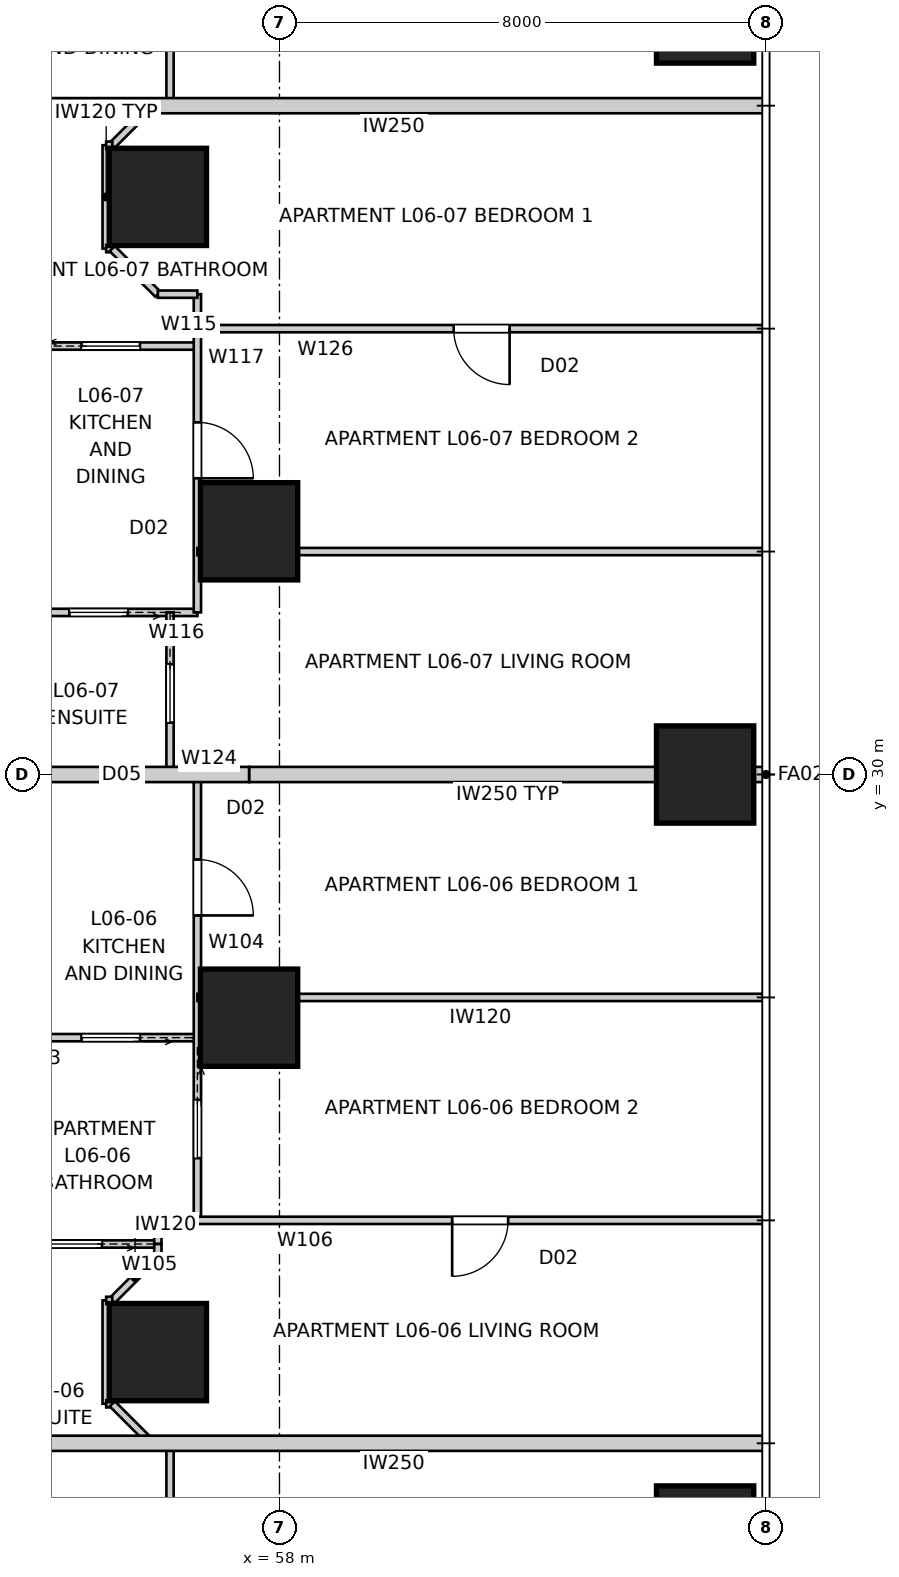
"""IFC4 building model, lengths in metres.
Left out: names, types, materials, properties, quantities, classifications, styles, units other than length and angle.
Written with IfcOpenShell. Run it as: python <this file> out.ifc"""

import sys

from ifc_helpers import new_model, si_unit, direction, frame, frame_2d, origin, origin_2d, place, context, subcontext, project, spatial, rectangle, extrude, element, fill, save


model = new_model("IFC4")
c1 = context("Model", 3, precision=1e-05, world=origin(), true_north=direction((0.0, 1.0)))
c2 = subcontext(c1, "Body", "Model", "MODEL_VIEW")
j1 = project(units=[si_unit("LENGTHUNIT", "METRE"), si_unit("PLANEANGLEUNIT", "RADIAN")], contexts=[c1])
p1 = place(None, origin())
s1 = spatial("IfcSite", under=j1, at=p1, CompositionType="ELEMENT")
p2 = place(p1, origin())
s2 = spatial("IfcBuilding", under=s1, at=p2, CompositionType="ELEMENT")
p3 = place(p2, frame((0.0, 0.0, 25.2)))
s3 = spatial("IfcBuildingStorey", under=s2, at=p3, CompositionType="ELEMENT", Elevation=25.2)
for number, where, z_axis, x_axis in (
    (1, (65.0, 17.5, 0.0), (0.0, 0.0, 1.0), (1.0, 0.0, 0.0)),
    (2, (65.0, 30.0, 0.0), (0.0, 0.0, 1.0), (1.0, 0.0, 0.0)),
    (3, (65.0, 42.5, 0.0), (0.0, 0.0, 1.0), (1.0, 0.0, 0.0)),
    (4, (57.5, 26.0, 0.0), (0.0, 0.0, 1.0), (1.0, 0.0, 0.0)),
    (5, (57.5, 34.0, 0.0), (0.0, 0.0, 1.0), (1.0, 0.0, 0.0)),
    (6, (56.0, 39.5, 0.0), (0.0, 0.0, 1.0), (1.0, 0.0, 0.0)),
    (7, (56.0, 20.5, 0.0), (0.0, 0.0, 1.0), (1.0, 0.0, 0.0)),
):
    element("IfcColumn", number, at=place(p3, frame(where, z_axis=z_axis, x_axis=x_axis)), inside=s3, PredefinedType="COLUMN", context=c2, shape_type="SweptSolid", body=[
        extrude(rectangle(XDim=1.6, YDim=1.6, at=origin_2d()), origin(), (0.0, 0.0, 1.0), 3.4),
    ])
for number, where, z_axis, x_axis in (
    (8, (66.0, 19.0, 0.0), (0.0, 0.0, 1.0), (-1.0, 0.0, 0.0)),
    (9, (66.0, 41.0, 0.0), (0.0, 0.0, 1.0), (-1.0, 0.0, 0.0)),
):
    element("IfcWall", number, at=place(p3, frame(where, z_axis=z_axis, x_axis=x_axis)), inside=s3, PredefinedType="PARTITIONING", context=c2, shape_type="SweptSolid", body=[
        extrude(rectangle(XDim=12.24, YDim=0.25, at=frame_2d((6.12, 0.0))), origin(), (0.0, 0.0, 1.0), 3.25),
    ])
p4 = place(p3, frame((66.0, 30.0, 0.0), z_axis=(0.0, 0.0, 1.0), x_axis=(-1.0, 0.0, 0.0)))
e10 = element("IfcWall", 10, at=p4, inside=s3, PredefinedType="PARTITIONING", context=c2, shape_type="SweptSolid", body=[
    extrude(rectangle(XDim=8.5, YDim=0.25, at=frame_2d((4.25, 0.0))), origin(), (0.0, 0.0, 1.0), 3.25),
])
p5 = place(p3, frame((57.5, 30.0, 0.0), z_axis=(0.0, 0.0, 1.0), x_axis=(-1.0, 0.0, 0.0)))
e11 = element("IfcWall", 11, at=p5, inside=s3, PredefinedType="PARTITIONING", context=c2, shape_type="SweptSolid", body=[
    extrude(rectangle(XDim=3.74, YDim=0.25, at=frame_2d((1.87, 0.0))), origin(), (0.0, 0.0, 1.0), 2.796),
])
p6 = place(p3, frame((56.2, 19.0, 0.0), z_axis=(0.0, 0.0, 1.0), x_axis=(0.0, -1.0, 0.0)))
e12 = element("IfcWall", 12, at=p6, inside=s3, PredefinedType="PARTITIONING", context=c2, shape_type="SweptSolid", body=[
    extrude(rectangle(XDim=7.8, YDim=0.12, at=frame_2d((3.9, 0.0))), origin(), (0.0, 0.0, 1.0), 3.25),
])
p7 = place(p6, frame((2.24, 0.0, 0.0)))
e13 = element("IfcOpeningElement", 13, at=p7, cuts=e12, PredefinedType="OPENING", context=c2, shape_type="SweptSolid", body=[
    extrude(rectangle(XDim=0.92, YDim=2.34, at=frame_2d((0.46, 1.17))), frame((0.0, 0.07, 0.0), z_axis=(0.0, -1.0, 0.0), x_axis=(1.0, 0.0, 0.0)), (0.0, 0.0, 1.0), 0.14),
])
p8 = place(p3, frame((56.65, 25.672, 0.0), z_axis=(0.0, 0.0, 1.0), x_axis=(-1.0, 0.0, 0.0)))
e14 = element("IfcWall", 14, at=p8, inside=s3, PredefinedType="PARTITIONING", context=c2, shape_type="SweptSolid", body=[
    extrude(rectangle(XDim=2.85, YDim=0.12, at=frame_2d((1.425, 0.0))), origin(), (0.0, 0.0, 1.0), 3.25),
])
p9 = place(p8, frame((0.945, 0.0, 0.0)))
e15 = element("IfcOpeningElement", 15, at=p9, cuts=e14, PredefinedType="OPENING", context=c2, shape_type="SweptSolid", body=[
    extrude(rectangle(XDim=0.96, YDim=2.1, at=frame_2d((0.48, 1.05))), frame((0.0, 0.07, 0.0), z_axis=(0.0, -1.0, 0.0), x_axis=(1.0, 0.0, 0.0)), (0.0, 0.0, 1.0), 0.14),
])
p10 = place(p3, frame((56.65, 30.0, 0.0), z_axis=(0.0, 0.0, 1.0), x_axis=(0.0, -1.0, 0.0)))
e16 = element("IfcWall", 16, at=p10, inside=s3, PredefinedType="PARTITIONING", context=c2, shape_type="SweptSolid", body=[
    extrude(rectangle(XDim=7.333, YDim=0.12, at=frame_2d((3.667, 0.0))), origin(), (0.0, 0.0, 1.0), 2.55),
])
p11 = place(p10, frame((1.398, 0.0, 0.0)))
e17 = element("IfcOpeningElement", 17, at=p11, cuts=e16, PredefinedType="OPENING", context=c2, shape_type="SweptSolid", body=[
    extrude(rectangle(XDim=0.92, YDim=2.34, at=frame_2d((0.46, 1.17))), frame((0.0, 0.07, 0.0), z_axis=(0.0, -1.0, 0.0), x_axis=(1.0, 0.0, 0.0)), (0.0, 0.0, 1.0), 0.14),
])
p12 = place(p10, frame((5.351, 0.0, 0.0)))
e18 = element("IfcOpeningElement", 18, at=p12, cuts=e16, PredefinedType="OPENING", context=c2, shape_type="SweptSolid", body=[
    extrude(rectangle(XDim=0.96, YDim=2.1, at=frame_2d((0.48, 1.05))), frame((0.0, 0.07, 0.0), z_axis=(0.0, -1.0, 0.0), x_axis=(1.0, 0.0, 0.0)), (0.0, 0.0, 1.0), 0.14),
])
p13 = place(p3, frame((56.0, 22.278, 0.0), z_axis=(0.0, 0.0, 1.0), x_axis=(-1.0, 0.0, 0.0)))
e19 = element("IfcWall", 19, at=p13, inside=s3, PredefinedType="PARTITIONING", context=c2, shape_type="SweptSolid", body=[
    extrude(rectangle(XDim=2.2, YDim=0.12, at=frame_2d((1.1, 0.0))), origin(), (0.0, 0.0, 1.0), 3.25),
])
p14 = place(p13, frame((0.92, 0.0, 0.0)))
e20 = element("IfcOpeningElement", 20, at=p14, cuts=e19, PredefinedType="OPENING", context=c2, shape_type="SweptSolid", body=[
    extrude(rectangle(XDim=0.96, YDim=2.1, at=frame_2d((0.48, 1.05))), frame((0.0, 0.07, 0.0), z_axis=(0.0, -1.0, 0.0), x_axis=(1.0, 0.0, 0.0)), (0.0, 0.0, 1.0), 0.14),
])
p15 = place(p3, frame((65.96, 22.667, 0.0), z_axis=(0.0, 0.0, 1.0), x_axis=(-1.0, 0.0, 0.0)))
e21 = element("IfcWall", 21, at=p15, inside=s3, PredefinedType="PARTITIONING", context=c2, shape_type="SweptSolid", body=[
    extrude(rectangle(XDim=9.96, YDim=0.12, at=frame_2d((4.98, 0.0))), origin(), (0.0, 0.0, 1.0), 3.25),
])
p16 = place(p15, frame((4.2, 0.0, 0.0)))
e22 = element("IfcOpeningElement", 22, at=p16, cuts=e21, PredefinedType="OPENING", context=c2, shape_type="SweptSolid", body=[
    extrude(rectangle(XDim=0.92, YDim=2.34, at=frame_2d((0.46, 1.17))), frame((0.0, 0.07, 0.0), z_axis=(0.0, -1.0, 0.0), x_axis=(1.0, 0.0, 0.0)), (0.0, 0.0, 1.0), 0.14),
])
p17 = place(p3, frame((56.0, 22.667, 0.0), z_axis=(0.0, 0.0, 1.0), x_axis=(0.0, -1.0, 0.0)))
e23 = element("IfcWall", 23, at=p17, inside=s3, PredefinedType="PARTITIONING", context=c2, shape_type="SweptSolid", body=[
    extrude(rectangle(XDim=0.389, YDim=0.12, at=frame_2d((0.194, 0.0))), origin(), (0.0, 0.0, 1.0), 3.25),
])
p18 = place(p3, frame((56.0, 22.1, 0.0), z_axis=(0.0, 0.0, 1.0), x_axis=(-0.707106781187, -0.707106781187, 0.0)))
e24 = element("IfcWall", 24, at=p18, inside=s3, PredefinedType="PARTITIONING", context=c2, shape_type="SweptSolid", body=[
    extrude(rectangle(XDim=1.061, YDim=0.12, at=frame_2d((0.53, 0.0))), origin(), (0.0, 0.0, 1.0), 3.25),
])
p19 = place(p3, frame((55.15, 21.35, 0.0), z_axis=(0.0, 0.0, 1.0), x_axis=(0.0, -1.0, 0.0)))
e25 = element("IfcWall", 25, at=p19, inside=s3, PredefinedType="PARTITIONING", context=c2, shape_type="SweptSolid", body=[
    extrude(rectangle(XDim=1.7, YDim=0.12, at=frame_2d((0.85, 0.0))), origin(), (0.0, 0.0, 1.0), 3.25),
])
p20 = place(p3, frame((55.25, 19.65, 0.0), z_axis=(0.0, 0.0, 1.0), x_axis=(0.707106781187, -0.707106781187, 0.0)))
e26 = element("IfcWall", 26, at=p20, inside=s3, PredefinedType="PARTITIONING", context=c2, shape_type="SweptSolid", body=[
    extrude(rectangle(XDim=0.919, YDim=0.12, at=frame_2d((0.459, 0.0))), origin(), (0.0, 0.0, 1.0), 3.25),
])
p21 = place(p3, frame((65.96, 26.333, 0.0), z_axis=(0.0, 0.0, 1.0), x_axis=(-1.0, 0.0, 0.0)))
e27 = element("IfcWall", 27, at=p21, inside=s3, PredefinedType="PARTITIONING", context=c2, shape_type="SweptSolid", body=[
    extrude(rectangle(XDim=9.31, YDim=0.12, at=frame_2d((4.655, 0.0))), origin(), (0.0, 0.0, 1.0), 3.25),
])
p22 = place(p3, frame((53.8, 37.046, 0.0), z_axis=(0.0, 0.0, 1.0), x_axis=(1.0, 0.0, 0.0)))
e28 = element("IfcWall", 28, at=p22, inside=s3, PredefinedType="PARTITIONING", context=c2, shape_type="SweptSolid", body=[
    extrude(rectangle(XDim=2.85, YDim=0.12, at=frame_2d((1.425, 0.0))), origin(), (0.0, 0.0, 1.0), 3.25),
])
p23 = place(p22, frame((0.945, 0.0, 0.0)))
e29 = element("IfcOpeningElement", 29, at=p23, cuts=e28, PredefinedType="OPENING", context=c2, shape_type="SweptSolid", body=[
    extrude(rectangle(XDim=0.96, YDim=2.1, at=frame_2d((0.48, 1.05))), frame((0.0, 0.07, 0.0), z_axis=(0.0, -1.0, 0.0), x_axis=(1.0, 0.0, 0.0)), (0.0, 0.0, 1.0), 0.14),
])
p24 = place(p3, frame((56.65, 32.666, 0.0), z_axis=(0.0, 0.0, 1.0), x_axis=(-1.0, 0.0, 0.0)))
e30 = element("IfcWall", 30, at=p24, inside=s3, PredefinedType="PARTITIONING", context=c2, shape_type="SweptSolid", body=[
    extrude(rectangle(XDim=2.85, YDim=0.12, at=frame_2d((1.425, 0.0))), origin(), (0.0, 0.0, 1.0), 3.25),
])
p25 = place(p24, frame((1.145, 0.0, 0.0)))
e31 = element("IfcOpeningElement", 31, at=p25, cuts=e30, PredefinedType="OPENING", context=c2, shape_type="SweptSolid", body=[
    extrude(rectangle(XDim=0.96, YDim=2.1, at=frame_2d((0.48, 1.05))), frame((0.0, 0.07, 0.0), z_axis=(0.0, -1.0, 0.0), x_axis=(1.0, 0.0, 0.0)), (0.0, 0.0, 1.0), 0.14),
])
p26 = place(p3, frame((56.65, 37.9, 0.0), z_axis=(0.0, 0.0, 1.0), x_axis=(0.0, -1.0, 0.0)))
e32 = element("IfcWall", 32, at=p26, inside=s3, PredefinedType="PARTITIONING", context=c2, shape_type="SweptSolid", body=[
    extrude(rectangle(XDim=5.234, YDim=0.12, at=frame_2d((2.617, 0.0))), origin(), (0.0, 0.0, 1.0), 2.55),
])
p27 = place(p26, frame((2.109, 0.0, 0.0)))
e33 = element("IfcOpeningElement", 33, at=p27, cuts=e32, PredefinedType="OPENING", context=c2, shape_type="SweptSolid", body=[
    extrude(rectangle(XDim=0.92, YDim=2.34, at=frame_2d((0.46, 1.17))), frame((0.0, 0.07, 0.0), z_axis=(0.0, -1.0, 0.0), x_axis=(1.0, 0.0, 0.0)), (0.0, 0.0, 1.0), 0.14),
])
p28 = place(p3, frame((55.9, 41.0, 0.0), z_axis=(0.0, 0.0, 1.0), x_axis=(-0.707106781187, -0.707106781187, 0.0)))
e34 = element("IfcWall", 34, at=p28, inside=s3, PredefinedType="PARTITIONING", context=c2, shape_type="SweptSolid", body=[
    extrude(rectangle(XDim=0.919, YDim=0.12, at=frame_2d((0.459, 0.0))), origin(), (0.0, 0.0, 1.0), 3.25),
])
p29 = place(p3, frame((55.15, 40.35, 0.0), z_axis=(0.0, 0.0, 1.0), x_axis=(0.0, -1.0, 0.0)))
e35 = element("IfcWall", 35, at=p29, inside=s3, PredefinedType="PARTITIONING", context=c2, shape_type="SweptSolid", body=[
    extrude(rectangle(XDim=1.7, YDim=0.12, at=frame_2d((0.85, 0.0))), origin(), (0.0, 0.0, 1.0), 3.25),
])
p30 = place(p3, frame((55.25, 38.65, 0.0), z_axis=(0.0, 0.0, 1.0), x_axis=(0.707106781187, -0.707106781187, 0.0)))
e36 = element("IfcWall", 36, at=p30, inside=s3, PredefinedType="PARTITIONING", context=c2, shape_type="SweptSolid", body=[
    extrude(rectangle(XDim=1.061, YDim=0.12, at=frame_2d((0.53, 0.0))), origin(), (0.0, 0.0, 1.0), 3.25),
])
p31 = place(p3, frame((56.0, 37.9, 0.0), z_axis=(0.0, 0.0, 1.0), x_axis=(1.0, 0.0, 0.0)))
e37 = element("IfcWall", 37, at=p31, inside=s3, PredefinedType="PARTITIONING", context=c2, shape_type="SweptSolid", body=[
    extrude(rectangle(XDim=0.65, YDim=0.12, at=frame_2d((0.325, 0.0))), origin(), (0.0, 0.0, 1.0), 3.25),
])
p32 = place(p3, frame((56.2, 32.666, 0.0), z_axis=(0.0, 0.0, 1.0), x_axis=(0.0, -1.0, 0.0)))
e38 = element("IfcWall", 38, at=p32, inside=s3, PredefinedType="PARTITIONING", context=c2, shape_type="SweptSolid", body=[
    extrude(rectangle(XDim=2.666, YDim=0.12, at=frame_2d((1.333, 0.0))), origin(), (0.0, 0.0, 1.0), 3.25),
])
p33 = place(p32, frame((0.853, 0.0, 0.0)))
e39 = element("IfcOpeningElement", 39, at=p33, cuts=e38, PredefinedType="OPENING", context=c2, shape_type="SweptSolid", body=[
    extrude(rectangle(XDim=0.96, YDim=2.1, at=frame_2d((0.48, 1.05))), frame((0.0, 0.07, 0.0), z_axis=(0.0, -1.0, 0.0), x_axis=(1.0, 0.0, 0.0)), (0.0, 0.0, 1.0), 0.14),
])
p34 = place(p3, frame((56.65, 33.667, 0.0), z_axis=(0.0, 0.0, 1.0), x_axis=(1.0, 0.0, 0.0)))
e40 = element("IfcWall", 40, at=p34, inside=s3, PredefinedType="PARTITIONING", context=c2, shape_type="SweptSolid", body=[
    extrude(rectangle(XDim=9.31, YDim=0.12, at=frame_2d((4.655, 0.0))), origin(), (0.0, 0.0, 1.0), 3.25),
])
p35 = place(p3, frame((65.96, 37.333, 0.0), z_axis=(0.0, 0.0, 1.0), x_axis=(-1.0, 0.0, 0.0)))
e41 = element("IfcWall", 41, at=p35, inside=s3, PredefinedType="PARTITIONING", context=c2, shape_type="SweptSolid", body=[
    extrude(rectangle(XDim=9.31, YDim=0.12, at=frame_2d((4.655, 0.0))), origin(), (0.0, 0.0, 1.0), 3.25),
])
p36 = place(p35, frame((4.175, 0.0, 0.0)))
e42 = element("IfcOpeningElement", 42, at=p36, cuts=e41, PredefinedType="OPENING", context=c2, shape_type="SweptSolid", body=[
    extrude(rectangle(XDim=0.92, YDim=2.34, at=frame_2d((0.46, 1.17))), frame((0.0, 0.07, 0.0), z_axis=(0.0, -1.0, 0.0), x_axis=(1.0, 0.0, 0.0)), (0.0, 0.0, 1.0), 0.14),
])
p37 = place(p3, frame((56.2, 48.333, 0.0), z_axis=(0.0, 0.0, 1.0), x_axis=(0.0, -1.0, 0.0)))
e43 = element("IfcWall", 43, at=p37, inside=s3, PredefinedType="PARTITIONING", context=c2, shape_type="SweptSolid", body=[
    extrude(rectangle(XDim=7.333, YDim=0.12, at=frame_2d((3.667, 0.0))), origin(), (0.0, 0.0, 1.0), 3.25),
])
p38 = place(p37, frame((3.207, 0.0, 0.0)))
e44 = element("IfcOpeningElement", 44, at=p38, cuts=e43, PredefinedType="OPENING", context=c2, shape_type="SweptSolid", body=[
    extrude(rectangle(XDim=0.92, YDim=2.34, at=frame_2d((0.46, 1.17))), frame((0.0, 0.07, 0.0), z_axis=(0.0, -1.0, 0.0), x_axis=(1.0, 0.0, 0.0)), (0.0, 0.0, 1.0), 0.14),
])
p39 = place(p3, frame((56.0, 22.1, 0.0), z_axis=(0.0, 0.0, 1.0), x_axis=(0.0, 1.0, 0.0)))
e45 = element("IfcWall", 45, at=p39, inside=s3, PredefinedType="PARTITIONING", context=c2, shape_type="SweptSolid", body=[
    extrude(rectangle(XDim=0.178, YDim=0.12, at=frame_2d((0.089, 0.0))), origin(), (0.0, 0.0, 1.0), 3.25),
])
for number, where, z_axis, x_axis in (
    (46, (55.15, 21.35, 0.0), (0.0, 0.0, 1.0), (1.0, 0.0, 0.0)),
    (47, (55.15, 19.65, 0.0), (0.0, 0.0, 1.0), (1.0, 0.0, 0.0)),
    (48, (55.15, 40.35, 0.0), (0.0, 0.0, 1.0), (1.0, 0.0, 0.0)),
    (49, (55.15, 38.65, 0.0), (0.0, 0.0, 1.0), (1.0, 0.0, 0.0)),
):
    element("IfcWall", number, at=place(p3, frame(where, z_axis=z_axis, x_axis=x_axis)), inside=s3, PredefinedType="PARTITIONING", context=c2, shape_type="SweptSolid", body=[
        extrude(rectangle(XDim=0.1, YDim=0.12, at=frame_2d((0.05, 0.0))), origin(), (0.0, 0.0, 1.0), 3.25),
    ])
p40 = place(p27, origin())
e50 = element("IfcDoor", 50, at=p40, inside=s3, OperationType="SINGLE_SWING_RIGHT", PredefinedType="DOOR", context=c2, shape_type="SweptSolid", body=[
    extrude(rectangle(XDim=0.92, YDim=2.34, at=frame_2d((0.46, 1.17))), frame((0.0, 0.025, 0.0), z_axis=(0.0, -1.0, 0.0), x_axis=(1.0, 0.0, 0.0)), (0.0, 0.0, 1.0), 0.05),
])
fill(e33, e50)
p41 = place(p23, origin())
e51 = element("IfcDoor", 51, at=p41, inside=s3, OperationType="SLIDING_TO_LEFT", PredefinedType="DOOR", context=c2, shape_type="SweptSolid", body=[
    extrude(rectangle(XDim=0.96, YDim=2.1, at=frame_2d((0.48, 1.05))), frame((0.0, 0.025, 0.0), z_axis=(0.0, -1.0, 0.0), x_axis=(1.0, 0.0, 0.0)), (0.0, 0.0, 1.0), 0.05),
])
fill(e29, e51)
p42 = place(p25, origin())
e52 = element("IfcDoor", 52, at=p42, inside=s3, OperationType="SLIDING_TO_LEFT", PredefinedType="DOOR", context=c2, shape_type="SweptSolid", body=[
    extrude(rectangle(XDim=0.96, YDim=2.1, at=frame_2d((0.48, 1.05))), frame((0.0, 0.025, 0.0), z_axis=(0.0, -1.0, 0.0), x_axis=(1.0, 0.0, 0.0)), (0.0, 0.0, 1.0), 0.05),
])
fill(e31, e52)
p43 = place(p11, origin())
e53 = element("IfcDoor", 53, at=p43, inside=s3, OperationType="SINGLE_SWING_RIGHT", PredefinedType="DOOR", context=c2, shape_type="SweptSolid", body=[
    extrude(rectangle(XDim=0.92, YDim=2.34, at=frame_2d((0.46, 1.17))), frame((0.0, 0.025, 0.0), z_axis=(0.0, -1.0, 0.0), x_axis=(1.0, 0.0, 0.0)), (0.0, 0.0, 1.0), 0.05),
])
fill(e17, e53)
p44 = place(p9, origin())
e54 = element("IfcDoor", 54, at=p44, inside=s3, OperationType="SLIDING_TO_LEFT", PredefinedType="DOOR", context=c2, shape_type="SweptSolid", body=[
    extrude(rectangle(XDim=0.96, YDim=2.1, at=frame_2d((0.48, 1.05))), frame((0.0, 0.025, 0.0), z_axis=(0.0, -1.0, 0.0), x_axis=(1.0, 0.0, 0.0)), (0.0, 0.0, 1.0), 0.05),
])
fill(e15, e54)
p45 = place(p33, origin())
e55 = element("IfcDoor", 55, at=p45, inside=s3, OperationType="SLIDING_TO_LEFT", PredefinedType="DOOR", context=c2, shape_type="SweptSolid", body=[
    extrude(rectangle(XDim=0.96, YDim=2.1, at=frame_2d((0.48, 1.05))), frame((0.0, 0.025, 0.0), z_axis=(0.0, -1.0, 0.0), x_axis=(1.0, 0.0, 0.0)), (0.0, 0.0, 1.0), 0.05),
])
fill(e39, e55)
p46 = place(p12, origin())
e56 = element("IfcDoor", 56, at=p46, inside=s3, OperationType="SLIDING_TO_LEFT", PredefinedType="DOOR", context=c2, shape_type="SweptSolid", body=[
    extrude(rectangle(XDim=0.96, YDim=2.1, at=frame_2d((0.48, 1.05))), frame((0.0, 0.025, 0.0), z_axis=(0.0, -1.0, 0.0), x_axis=(1.0, 0.0, 0.0)), (0.0, 0.0, 1.0), 0.05),
])
fill(e18, e56)
p47 = place(p14, origin())
e57 = element("IfcDoor", 57, at=p47, inside=s3, OperationType="SLIDING_TO_LEFT", PredefinedType="DOOR", context=c2, shape_type="SweptSolid", body=[
    extrude(rectangle(XDim=0.96, YDim=2.1, at=frame_2d((0.48, 1.05))), frame((0.0, 0.025, 0.0), z_axis=(0.0, -1.0, 0.0), x_axis=(1.0, 0.0, 0.0)), (0.0, 0.0, 1.0), 0.05),
])
fill(e20, e57)
p48 = place(p36, origin())
e58 = element("IfcDoor", 58, at=p48, inside=s3, OperationType="SINGLE_SWING_LEFT", PredefinedType="DOOR", context=c2, shape_type="SweptSolid", body=[
    extrude(rectangle(XDim=0.92, YDim=2.34, at=frame_2d((0.46, 1.17))), frame((0.0, 0.025, 0.0), z_axis=(0.0, -1.0, 0.0), x_axis=(1.0, 0.0, 0.0)), (0.0, 0.0, 1.0), 0.05),
])
fill(e42, e58)
p49 = place(p16, origin())
e59 = element("IfcDoor", 59, at=p49, inside=s3, OperationType="SINGLE_SWING_RIGHT", PredefinedType="DOOR", context=c2, shape_type="SweptSolid", body=[
    extrude(rectangle(XDim=0.92, YDim=2.34, at=frame_2d((0.46, 1.17))), frame((0.0, 0.025, 0.0), z_axis=(0.0, -1.0, 0.0), x_axis=(1.0, 0.0, 0.0)), (0.0, 0.0, 1.0), 0.05),
])
fill(e22, e59)
save(model, sys.argv[1])
